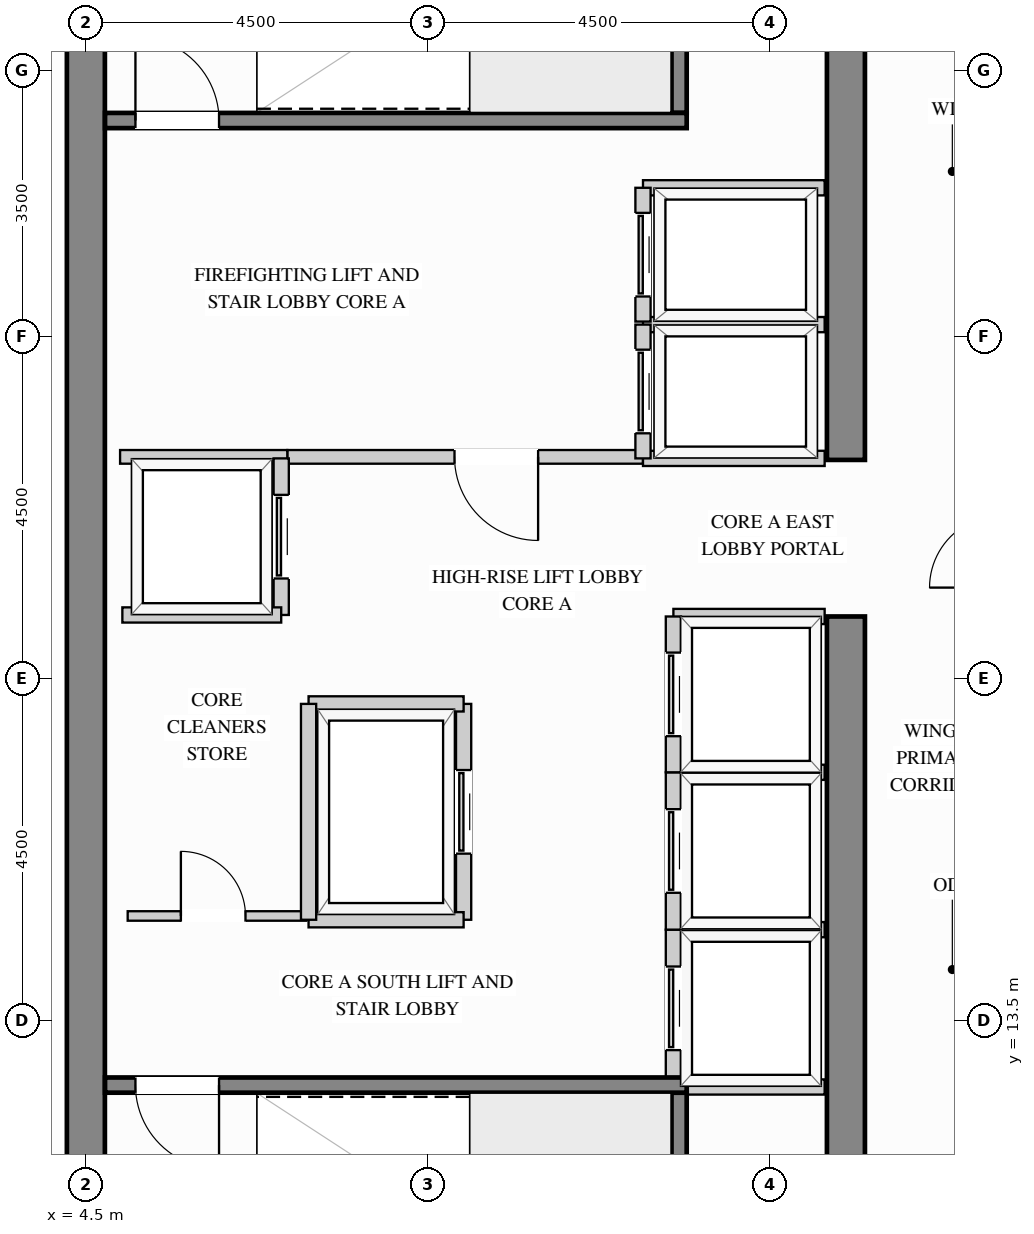
"""IFC4 building model, lengths in metres.
Left out: names, types, materials, properties, quantities, classifications, styles, units other than length and angle.
Written with IfcOpenShell. Run it as: python <this file> out.ifc"""

import sys

from ifc_helpers import new_model, si_unit, direction, frame, frame_2d, origin, place, context, subcontext, project, spatial, rectangle, extrude, source, transform, mapped, element, fill, save


model = new_model("IFC4")
c1 = context("Model", 3, precision=1e-05, world=origin(), true_north=direction((0.0, 1.0)))
c2 = subcontext(c1, "Body", "Model", "MODEL_VIEW")
j1 = project(units=[si_unit("LENGTHUNIT", "METRE"), si_unit("PLANEANGLEUNIT", "RADIAN")], contexts=[c1])
p1 = place(None, origin())
s1 = spatial("IfcSite", under=j1, at=p1, CompositionType="ELEMENT")
p2 = place(p1, origin())
s2 = spatial("IfcBuilding", under=s1, at=p2, CompositionType="ELEMENT")
p3 = place(p2, frame((0.0, 0.0, 234.0)))
s3 = spatial("IfcBuildingStorey", under=s2, at=p3, CompositionType="ELEMENT", Elevation=234.0)
m1 = source(origin(), c2, "Body", "SweptSolid", [
    extrude(rectangle(XDim=10.07, YDim=0.5, at=frame_2d((5.035, 0.0))), origin(), (0.0, 0.0, 1.0), 3.4),
])
p4 = place(p3, frame((14.5, 8.75, 0.0), z_axis=(0.0, 0.0, 1.0), x_axis=(0.0, 1.0, 0.0)))
e1 = element("IfcWall", 1, at=p4, inside=s3, PredefinedType="SHEAR", context=c2, shape_type="MappedRepresentation", body=[
    mapped(m1, transform((0.0, 0.0, 0.0), x_axis=(1.0, 0.0, 0.0), y_axis=(0.0, 1.0, 0.0), z_axis=(0.0, 0.0, 1.0))),
])
m2 = source(origin(), c2, "Body", "SweptSolid", [
    extrude(rectangle(XDim=8.37, YDim=0.5, at=frame_2d((4.185, 0.0))), origin(), (0.0, 0.0, 1.0), 3.4),
])
p5 = place(p3, frame((14.5, 20.88, 0.0), z_axis=(0.0, 0.0, 1.0), x_axis=(0.0, 1.0, 0.0)))
e2 = element("IfcWall", 2, at=p5, inside=s3, PredefinedType="SHEAR", context=c2, shape_type="MappedRepresentation", body=[
    mapped(m2, transform((0.0, 0.0, 0.0), x_axis=(1.0, 0.0, 0.0), y_axis=(0.0, 1.0, 0.0), z_axis=(0.0, 0.0, 1.0))),
])
m3 = source(origin(), c2, "Body", "SweptSolid", [
    extrude(rectangle(XDim=20.5, YDim=0.5, at=frame_2d((10.25, 0.0))), origin(), (0.0, 0.0, 1.0), 3.4),
])
p6 = place(p3, frame((4.5, 8.75, 0.0), z_axis=(0.0, 0.0, 1.0), x_axis=(0.0, 1.0, 0.0)))
e3 = element("IfcWall", 3, at=p6, inside=s3, PredefinedType="SHEAR", context=c2, shape_type="MappedRepresentation", body=[
    mapped(m3, transform((0.0, 0.0, 0.0), x_axis=(1.0, 0.0, 0.0), y_axis=(0.0, 1.0, 0.0), z_axis=(0.0, 0.0, 1.0))),
])
p7 = place(p3, frame((7.15, 20.92, 0.0), z_axis=(0.0, 0.0, 1.0), x_axis=(1.0, 0.0, 0.0)))
e4 = element("IfcWall", 4, at=p7, inside=s3, PredefinedType="PARTITIONING", context=c2, shape_type="SweptSolid", body=[
    extrude(rectangle(XDim=4.68, YDim=0.18, at=frame_2d((2.34, 0.0))), origin(), (0.0, 0.0, 1.0), 3.385),
])
p8 = place(p7, frame((2.2, 0.0, 0.0)))
e5 = element("IfcOpeningElement", 5, at=p8, cuts=e4, PredefinedType="OPENING", context=c2, shape_type="SweptSolid", body=[
    extrude(rectangle(XDim=1.1, YDim=2.15, at=frame_2d((0.55, 1.075))), frame((0.0, 0.1, 0.0), z_axis=(0.0, -1.0, 0.0), x_axis=(1.0, 0.0, 0.0)), (0.0, 0.0, 1.0), 0.2),
])
m4 = source(origin(), c2, "Body", "SweptSolid", [
    extrude(rectangle(XDim=2.2, YDim=0.18, at=frame_2d((1.1, 0.0))), origin(), (0.0, 0.0, 1.0), 3.385),
])
p9 = place(p3, frame((4.95, 20.92, 0.0), z_axis=(0.0, 0.0, 1.0), x_axis=(1.0, 0.0, 0.0)))
e6 = element("IfcWall", 6, at=p9, inside=s3, PredefinedType="PARTITIONING", context=c2, shape_type="MappedRepresentation", body=[
    mapped(m4, transform((0.0, 0.0, 0.0), x_axis=(1.0, 0.0, 0.0), y_axis=(0.0, 1.0, 0.0), z_axis=(0.0, 0.0, 1.0))),
])
p10 = place(p3, frame((5.05, 14.88, 0.0), z_axis=(0.0, 0.0, 1.0), x_axis=(1.0, 0.0, 0.0)))
e7 = element("IfcWall", 7, at=p10, inside=s3, PredefinedType="PARTITIONING", context=c2, shape_type="SweptSolid", body=[
    extrude(rectangle(XDim=2.35, YDim=0.125, at=frame_2d((1.175, 0.0))), origin(), (0.0, 0.0, 1.0), 3.385),
])
p11 = place(p10, frame((0.7, 0.0, 0.0)))
e8 = element("IfcOpeningElement", 8, at=p11, cuts=e7, PredefinedType="OPENING", context=c2, shape_type="SweptSolid", body=[
    extrude(rectangle(XDim=0.85, YDim=2.1, at=frame_2d((0.425, 1.05))), frame((0.0, 0.073, 0.0), z_axis=(0.0, -1.0, 0.0), x_axis=(1.0, 0.0, 0.0)), (0.0, 0.0, 1.0), 0.145),
])
m5 = source(origin(), c2, "Body", "SweptSolid", [
    extrude(rectangle(XDim=2.39, YDim=0.2, at=frame_2d((1.195, 0.0))), origin(), (0.0, 0.0, 1.0), 3.385),
])
for number, where, z_axis, x_axis in (
    (9, (11.83, 22.66, 0.0), (0.0, 0.0, 1.0), (1.0, 0.0, 0.0)),
    (10, (11.83, 20.9, 0.0), (0.0, 0.0, 1.0), (1.0, 0.0, 0.0)),
):
    element("IfcWall", number, at=place(p3, frame(where, z_axis=z_axis, x_axis=x_axis)), inside=s3, PredefinedType="PARTITIONING", context=c2, shape_type="MappedRepresentation", body=[
        mapped(m5, transform((0.0, 0.0, 0.0), x_axis=(1.0, 0.0, 0.0), y_axis=(0.0, 1.0, 0.0), z_axis=(0.0, 0.0, 1.0))),
    ])
p12 = place(p3, frame((11.83, 20.9, 0.0), z_axis=(0.0, 0.0, 1.0), x_axis=(0.0, 1.0, 0.0)))
e11 = element("IfcWall", 11, at=p12, inside=s3, PredefinedType="PARTITIONING", context=c2, shape_type="SweptSolid", body=[
    extrude(rectangle(XDim=1.76, YDim=0.2, at=frame_2d((0.88, 0.0))), origin(), (0.0, 0.0, 1.0), 3.385),
])
p13 = place(p12, frame((0.33, 0.0, 0.0)))
e12 = element("IfcOpeningElement", 12, at=p13, cuts=e11, PredefinedType="OPENING", context=c2, shape_type="SweptSolid", body=[
    extrude(rectangle(XDim=1.1, YDim=2.2, at=frame_2d((0.55, 1.1))), frame((0.0, 0.11, 0.0), z_axis=(0.0, -1.0, 0.0), x_axis=(1.0, 0.0, 0.0)), (0.0, 0.0, 1.0), 0.22),
])
p14 = place(p3, frame((11.83, 24.46, 0.0), z_axis=(0.0, 0.0, 1.0), x_axis=(1.0, 0.0, 0.0)))
e13 = element("IfcWall", 13, at=p14, inside=s3, PredefinedType="PARTITIONING", context=c2, shape_type="MappedRepresentation", body=[
    mapped(m5, transform((0.0, 0.0, 0.0), x_axis=(1.0, 0.0, 0.0), y_axis=(0.0, 1.0, 0.0), z_axis=(0.0, 0.0, 1.0))),
])
p15 = place(p3, frame((11.83, 22.7, 0.0), z_axis=(0.0, 0.0, 1.0), x_axis=(0.0, 1.0, 0.0)))
e14 = element("IfcWall", 14, at=p15, inside=s3, PredefinedType="PARTITIONING", context=c2, shape_type="SweptSolid", body=[
    extrude(rectangle(XDim=1.76, YDim=0.2, at=frame_2d((0.88, 0.0))), origin(), (0.0, 0.0, 1.0), 3.385),
])
p16 = place(p15, frame((0.33, 0.0, 0.0)))
e15 = element("IfcOpeningElement", 15, at=p16, cuts=e14, PredefinedType="OPENING", context=c2, shape_type="SweptSolid", body=[
    extrude(rectangle(XDim=1.1, YDim=2.2, at=frame_2d((0.55, 1.1))), frame((0.0, 0.11, 0.0), z_axis=(0.0, -1.0, 0.0), x_axis=(1.0, 0.0, 0.0)), (0.0, 0.0, 1.0), 0.22),
])
m6 = source(origin(), c2, "Body", "SweptSolid", [
    extrude(rectangle(XDim=1.99, YDim=0.2, at=frame_2d((0.995, 0.0))), origin(), (0.0, 0.0, 1.0), 3.385),
])
for number, where, z_axis, x_axis in (
    (16, (12.23, 14.7, 0.0), (0.0, 0.0, 1.0), (1.0, 0.0, 0.0)),
    (17, (12.23, 12.63, 0.0), (0.0, 0.0, 1.0), (1.0, 0.0, 0.0)),
):
    element("IfcWall", number, at=place(p3, frame(where, z_axis=z_axis, x_axis=x_axis)), inside=s3, PredefinedType="PARTITIONING", context=c2, shape_type="MappedRepresentation", body=[
        mapped(m6, transform((0.0, 0.0, 0.0), x_axis=(1.0, 0.0, 0.0), y_axis=(0.0, 1.0, 0.0), z_axis=(0.0, 0.0, 1.0))),
    ])
p17 = place(p3, frame((12.23, 12.63, 0.0), z_axis=(0.0, 0.0, 1.0), x_axis=(0.0, 1.0, 0.0)))
e18 = element("IfcWall", 18, at=p17, inside=s3, PredefinedType="PARTITIONING", context=c2, shape_type="SweptSolid", body=[
    extrude(rectangle(XDim=2.07, YDim=0.2, at=frame_2d((1.035, 0.0))), origin(), (0.0, 0.0, 1.0), 3.385),
])
p18 = place(p17, frame((0.485, 0.0, 0.0)))
e19 = element("IfcOpeningElement", 19, at=p18, cuts=e18, PredefinedType="OPENING", context=c2, shape_type="SweptSolid", body=[
    extrude(rectangle(XDim=1.1, YDim=2.2, at=frame_2d((0.55, 1.1))), frame((0.0, 0.11, 0.0), z_axis=(0.0, -1.0, 0.0), x_axis=(1.0, 0.0, 0.0)), (0.0, 0.0, 1.0), 0.22),
])
p19 = place(p3, frame((12.23, 16.77, 0.0), z_axis=(0.0, 0.0, 1.0), x_axis=(1.0, 0.0, 0.0)))
e20 = element("IfcWall", 20, at=p19, inside=s3, PredefinedType="PARTITIONING", context=c2, shape_type="MappedRepresentation", body=[
    mapped(m6, transform((0.0, 0.0, 0.0), x_axis=(1.0, 0.0, 0.0), y_axis=(0.0, 1.0, 0.0), z_axis=(0.0, 0.0, 1.0))),
])
p20 = place(p3, frame((12.23, 14.7, 0.0), z_axis=(0.0, 0.0, 1.0), x_axis=(0.0, 1.0, 0.0)))
e21 = element("IfcWall", 21, at=p20, inside=s3, PredefinedType="PARTITIONING", context=c2, shape_type="SweptSolid", body=[
    extrude(rectangle(XDim=2.07, YDim=0.2, at=frame_2d((1.035, 0.0))), origin(), (0.0, 0.0, 1.0), 3.385),
])
p21 = place(p20, frame((0.485, 0.0, 0.0)))
e22 = element("IfcOpeningElement", 22, at=p21, cuts=e21, PredefinedType="OPENING", context=c2, shape_type="SweptSolid", body=[
    extrude(rectangle(XDim=1.1, YDim=2.2, at=frame_2d((0.55, 1.1))), frame((0.0, 0.11, 0.0), z_axis=(0.0, -1.0, 0.0), x_axis=(1.0, 0.0, 0.0)), (0.0, 0.0, 1.0), 0.22),
])
p22 = place(p3, frame((12.23, 18.82, 0.0), z_axis=(0.0, 0.0, 1.0), x_axis=(1.0, 0.0, 0.0)))
e23 = element("IfcWall", 23, at=p22, inside=s3, PredefinedType="PARTITIONING", context=c2, shape_type="MappedRepresentation", body=[
    mapped(m6, transform((0.0, 0.0, 0.0), x_axis=(1.0, 0.0, 0.0), y_axis=(0.0, 1.0, 0.0), z_axis=(0.0, 0.0, 1.0))),
])
p23 = place(p3, frame((12.23, 16.77, 0.0), z_axis=(0.0, 0.0, 1.0), x_axis=(0.0, 1.0, 0.0)))
e24 = element("IfcWall", 24, at=p23, inside=s3, PredefinedType="PARTITIONING", context=c2, shape_type="SweptSolid", body=[
    extrude(rectangle(XDim=2.05, YDim=0.2, at=frame_2d((1.025, 0.0))), origin(), (0.0, 0.0, 1.0), 3.385),
])
p24 = place(p23, frame((0.475, 0.0, 0.0)))
e25 = element("IfcOpeningElement", 25, at=p24, cuts=e24, PredefinedType="OPENING", context=c2, shape_type="SweptSolid", body=[
    extrude(rectangle(XDim=1.1, YDim=2.2, at=frame_2d((0.55, 1.1))), frame((0.0, 0.11, 0.0), z_axis=(0.0, -1.0, 0.0), x_axis=(1.0, 0.0, 0.0)), (0.0, 0.0, 1.0), 0.22),
])
p25 = place(p3, frame((7.07, 18.84, 0.0), z_axis=(0.0, 0.0, 1.0), x_axis=(0.0, 1.0, 0.0)))
e26 = element("IfcWall", 26, at=p25, inside=s3, PredefinedType="PARTITIONING", context=c2, shape_type="SweptSolid", body=[
    extrude(rectangle(XDim=2.06, YDim=0.2, at=frame_2d((1.03, 0.0))), origin(), (0.0, 0.0, 1.0), 3.385),
])
p26 = place(p25, frame((0.48, 0.0, 0.0)))
e27 = element("IfcOpeningElement", 27, at=p26, cuts=e26, PredefinedType="OPENING", context=c2, shape_type="SweptSolid", body=[
    extrude(rectangle(XDim=1.1, YDim=2.2, at=frame_2d((0.55, 1.1))), frame((0.0, 0.11, 0.0), z_axis=(0.0, -1.0, 0.0), x_axis=(1.0, 0.0, 0.0)), (0.0, 0.0, 1.0), 0.22),
])
m7 = source(origin(), c2, "Body", "SweptSolid", [
    extrude(rectangle(XDim=2.09, YDim=0.2, at=frame_2d((1.045, 0.0))), origin(), (0.0, 0.0, 1.0), 3.385),
])
p27 = place(p3, frame((4.98, 18.84, 0.0), z_axis=(0.0, 0.0, 1.0), x_axis=(1.0, 0.0, 0.0)))
e28 = element("IfcWall", 28, at=p27, inside=s3, PredefinedType="PARTITIONING", context=c2, shape_type="MappedRepresentation", body=[
    mapped(m7, transform((0.0, 0.0, 0.0), x_axis=(1.0, 0.0, 0.0), y_axis=(0.0, 1.0, 0.0), z_axis=(0.0, 0.0, 1.0))),
])
p28 = place(p3, frame((9.47, 14.83, 0.0), z_axis=(0.0, 0.0, 1.0), x_axis=(0.0, 1.0, 0.0)))
e29 = element("IfcWall", 29, at=p28, inside=s3, PredefinedType="PARTITIONING", context=c2, shape_type="SweptSolid", body=[
    extrude(rectangle(XDim=2.84, YDim=0.2, at=frame_2d((1.42, 0.0))), origin(), (0.0, 0.0, 1.0), 3.385),
])
p29 = place(p28, frame((0.87, 0.0, 0.0)))
e30 = element("IfcOpeningElement", 30, at=p29, cuts=e29, PredefinedType="OPENING", context=c2, shape_type="SweptSolid", body=[
    extrude(rectangle(XDim=1.1, YDim=2.2, at=frame_2d((0.55, 1.1))), frame((0.0, 0.11, 0.0), z_axis=(0.0, -1.0, 0.0), x_axis=(1.0, 0.0, 0.0)), (0.0, 0.0, 1.0), 0.22),
])
m8 = source(origin(), c2, "Body", "SweptSolid", [
    extrude(rectangle(XDim=2.04, YDim=0.2, at=frame_2d((1.02, 0.0))), origin(), (0.0, 0.0, 1.0), 3.385),
])
for number, where, z_axis, x_axis in (
    (31, (7.43, 17.67, 0.0), (0.0, 0.0, 1.0), (1.0, 0.0, 0.0)),
    (32, (7.43, 14.83, 0.0), (0.0, 0.0, 1.0), (1.0, 0.0, 0.0)),
):
    element("IfcWall", number, at=place(p3, frame(where, z_axis=z_axis, x_axis=x_axis)), inside=s3, PredefinedType="PARTITIONING", context=c2, shape_type="MappedRepresentation", body=[
        mapped(m8, transform((0.0, 0.0, 0.0), x_axis=(1.0, 0.0, 0.0), y_axis=(0.0, 1.0, 0.0), z_axis=(0.0, 0.0, 1.0))),
    ])
m9 = source(origin(), c2, "Body", "SweptSolid", [
    extrude(rectangle(XDim=2.84, YDim=0.2, at=frame_2d((1.42, 0.0))), origin(), (0.0, 0.0, 1.0), 3.385),
])
p30 = place(p3, frame((7.43, 14.83, 0.0), z_axis=(0.0, 0.0, 1.0), x_axis=(0.0, 1.0, 0.0)))
e33 = element("IfcWall", 33, at=p30, inside=s3, PredefinedType="PARTITIONING", context=c2, shape_type="MappedRepresentation", body=[
    mapped(m9, transform((0.0, 0.0, 0.0), x_axis=(1.0, 0.0, 0.0), y_axis=(0.0, 1.0, 0.0), z_axis=(0.0, 0.0, 1.0))),
])
m10 = source(origin(), c2, "Body", "SweptSolid", [
    extrude(rectangle(XDim=3.803, YDim=0.2, at=frame_2d((1.901, 0.0))), origin(), (0.0, 0.0, 1.0), 3.4),
])
p31 = place(p3, frame((12.305, 8.752, 0.0), z_axis=(0.0, 0.0, 1.0), x_axis=(0.0, 1.0, 0.0)))
e34 = element("IfcWall", 34, at=p31, inside=s3, PredefinedType="SHEAR", context=c2, shape_type="MappedRepresentation", body=[
    mapped(m10, transform((0.0, 0.0, 0.0), x_axis=(1.0, 0.0, 0.0), y_axis=(0.0, 1.0, 0.0), z_axis=(0.0, 0.0, 1.0))),
])
p32 = place(p3, frame((4.752, 12.655, 0.0), z_axis=(0.0, 0.0, 1.0), x_axis=(1.0, 0.0, 0.0)))
e35 = element("IfcWall", 35, at=p32, inside=s3, PredefinedType="SHEAR", context=c2, shape_type="SweptSolid", body=[
    extrude(rectangle(XDim=7.653, YDim=0.2, at=frame_2d((3.827, 0.0))), origin(), (0.0, 0.0, 1.0), 3.4),
])
p33 = place(p32, frame((0.4, 0.0, 0.0)))
e36 = element("IfcOpeningElement", 36, at=p33, cuts=e35, PredefinedType="OPENING", context=c2, shape_type="SweptSolid", body=[
    extrude(rectangle(XDim=1.1, YDim=2.15, at=frame_2d((0.55, 1.075))), frame((0.0, 0.11, 0.0), z_axis=(0.0, -1.0, 0.0), x_axis=(1.0, 0.0, 0.0)), (0.0, 0.0, 1.0), 0.22),
])
p34 = place(p3, frame((12.305, 25.445, 0.0), z_axis=(0.0, 0.0, 1.0), x_axis=(0.0, 1.0, 0.0)))
e37 = element("IfcWall", 37, at=p34, inside=s3, PredefinedType="SHEAR", context=c2, shape_type="MappedRepresentation", body=[
    mapped(m10, transform((0.0, 0.0, 0.0), x_axis=(1.0, 0.0, 0.0), y_axis=(0.0, 1.0, 0.0), z_axis=(0.0, 0.0, 1.0))),
])
p35 = place(p3, frame((4.752, 25.345, 0.0), z_axis=(0.0, 0.0, 1.0), x_axis=(1.0, 0.0, 0.0)))
e38 = element("IfcWall", 38, at=p35, inside=s3, PredefinedType="SHEAR", context=c2, shape_type="SweptSolid", body=[
    extrude(rectangle(XDim=7.653, YDim=0.2, at=frame_2d((3.827, 0.0))), origin(), (0.0, 0.0, 1.0), 3.4),
])
p36 = place(p35, frame((0.4, 0.0, 0.0)))
e39 = element("IfcOpeningElement", 39, at=p36, cuts=e38, PredefinedType="OPENING", context=c2, shape_type="SweptSolid", body=[
    extrude(rectangle(XDim=1.1, YDim=2.15, at=frame_2d((0.55, 1.075))), frame((0.0, 0.11, 0.0), z_axis=(0.0, -1.0, 0.0), x_axis=(1.0, 0.0, 0.0)), (0.0, 0.0, 1.0), 0.22),
])
m11 = source(origin(), c2, "Body", "SweptSolid", [
    extrude(rectangle(XDim=1.1, YDim=2.15, at=frame_2d((0.55, 1.075))), frame((0.0, 0.025, 0.0), z_axis=(0.0, -1.0, 0.0), x_axis=(1.0, 0.0, 0.0)), (0.0, 0.0, 1.0), 0.05),
])
p37 = place(p8, origin())
e40 = element("IfcDoor", 40, at=p37, inside=s3, OperationType="SINGLE_SWING_RIGHT", PredefinedType="DOOR", context=c2, shape_type="MappedRepresentation", body=[
    mapped(m11, transform((0.0, 0.0, 0.0), x_axis=(1.0, 0.0, 0.0), y_axis=(0.0, 1.0, 0.0), z_axis=(0.0, 0.0, 1.0))),
])
fill(e5, e40)
m12 = source(origin(), c2, "Body", "SweptSolid", [
    extrude(rectangle(XDim=1.1, YDim=2.2, at=frame_2d((0.55, 1.1))), frame((0.0, 0.025, 0.0), z_axis=(0.0, -1.0, 0.0), x_axis=(1.0, 0.0, 0.0)), (0.0, 0.0, 1.0), 0.05),
])
p38 = place(p13, origin())
e41 = element("IfcDoor", 41, at=p38, inside=s3, OperationType="SLIDING_TO_LEFT", PredefinedType="DOOR", context=c2, shape_type="MappedRepresentation", body=[
    mapped(m12, transform((0.0, 0.0, 0.0), x_axis=(1.0, 0.0, 0.0), y_axis=(0.0, 1.0, 0.0), z_axis=(0.0, 0.0, 1.0))),
])
fill(e12, e41)
p39 = place(p16, origin())
e42 = element("IfcDoor", 42, at=p39, inside=s3, OperationType="SLIDING_TO_LEFT", PredefinedType="DOOR", context=c2, shape_type="MappedRepresentation", body=[
    mapped(m12, transform((0.0, 0.0, 0.0), x_axis=(1.0, 0.0, 0.0), y_axis=(0.0, 1.0, 0.0), z_axis=(0.0, 0.0, 1.0))),
])
fill(e15, e42)
p40 = place(p18, origin())
e43 = element("IfcDoor", 43, at=p40, inside=s3, OperationType="SLIDING_TO_LEFT", PredefinedType="DOOR", context=c2, shape_type="MappedRepresentation", body=[
    mapped(m12, transform((0.0, 0.0, 0.0), x_axis=(1.0, 0.0, 0.0), y_axis=(0.0, 1.0, 0.0), z_axis=(0.0, 0.0, 1.0))),
])
fill(e19, e43)
p41 = place(p21, origin())
e44 = element("IfcDoor", 44, at=p41, inside=s3, OperationType="SLIDING_TO_LEFT", PredefinedType="DOOR", context=c2, shape_type="MappedRepresentation", body=[
    mapped(m12, transform((0.0, 0.0, 0.0), x_axis=(1.0, 0.0, 0.0), y_axis=(0.0, 1.0, 0.0), z_axis=(0.0, 0.0, 1.0))),
])
fill(e22, e44)
p42 = place(p24, origin())
e45 = element("IfcDoor", 45, at=p42, inside=s3, OperationType="SLIDING_TO_LEFT", PredefinedType="DOOR", context=c2, shape_type="MappedRepresentation", body=[
    mapped(m12, transform((0.0, 0.0, 0.0), x_axis=(1.0, 0.0, 0.0), y_axis=(0.0, 1.0, 0.0), z_axis=(0.0, 0.0, 1.0))),
])
fill(e25, e45)
p43 = place(p26, origin())
e46 = element("IfcDoor", 46, at=p43, inside=s3, OperationType="SLIDING_TO_LEFT", PredefinedType="DOOR", context=c2, shape_type="MappedRepresentation", body=[
    mapped(m12, transform((0.0, 0.0, 0.0), x_axis=(1.0, 0.0, 0.0), y_axis=(0.0, 1.0, 0.0), z_axis=(0.0, 0.0, 1.0))),
])
fill(e27, e46)
p44 = place(p29, origin())
e47 = element("IfcDoor", 47, at=p44, inside=s3, OperationType="SLIDING_TO_LEFT", PredefinedType="DOOR", context=c2, shape_type="MappedRepresentation", body=[
    mapped(m12, transform((0.0, 0.0, 0.0), x_axis=(1.0, 0.0, 0.0), y_axis=(0.0, 1.0, 0.0), z_axis=(0.0, 0.0, 1.0))),
])
fill(e30, e47)
m13 = source(origin(), c2, "Body", "SweptSolid", [
    extrude(rectangle(XDim=0.85, YDim=2.1, at=frame_2d((0.425, 1.05))), frame((0.0, 0.025, 0.0), z_axis=(0.0, -1.0, 0.0), x_axis=(1.0, 0.0, 0.0)), (0.0, 0.0, 1.0), 0.05),
])
p45 = place(p11, origin())
e48 = element("IfcDoor", 48, at=p45, inside=s3, OperationType="SINGLE_SWING_LEFT", PredefinedType="DOOR", context=c2, shape_type="MappedRepresentation", body=[
    mapped(m13, transform((0.0, 0.0, 0.0), x_axis=(1.0, 0.0, 0.0), y_axis=(0.0, 1.0, 0.0), z_axis=(0.0, 0.0, 1.0))),
])
fill(e8, e48)
m14 = source(origin(), c2, "Body", "SweptSolid", [
    extrude(rectangle(XDim=1.1, YDim=2.15, at=frame_2d((0.55, 1.075))), frame((0.0, 0.025, 0.0), z_axis=(0.0, -1.0, 0.0), x_axis=(1.0, 0.0, 0.0)), (0.0, 0.0, 1.0), 0.05),
])
p46 = place(p33, origin())
e49 = element("IfcDoor", 49, at=p46, inside=s3, OperationType="SINGLE_SWING_RIGHT", PredefinedType="DOOR", context=c2, shape_type="MappedRepresentation", body=[
    mapped(m14, transform((0.0, 0.0, 0.0), x_axis=(1.0, 0.0, 0.0), y_axis=(0.0, 1.0, 0.0), z_axis=(0.0, 0.0, 1.0))),
])
fill(e36, e49)
p47 = place(p36, origin())
e50 = element("IfcDoor", 50, at=p47, inside=s3, OperationType="SINGLE_SWING_LEFT", PredefinedType="DOOR", context=c2, shape_type="MappedRepresentation", body=[
    mapped(m14, transform((0.0, 0.0, 0.0), x_axis=(1.0, 0.0, 0.0), y_axis=(0.0, 1.0, 0.0), z_axis=(0.0, 0.0, 1.0))),
])
fill(e39, e50)
save(model, sys.argv[1])
